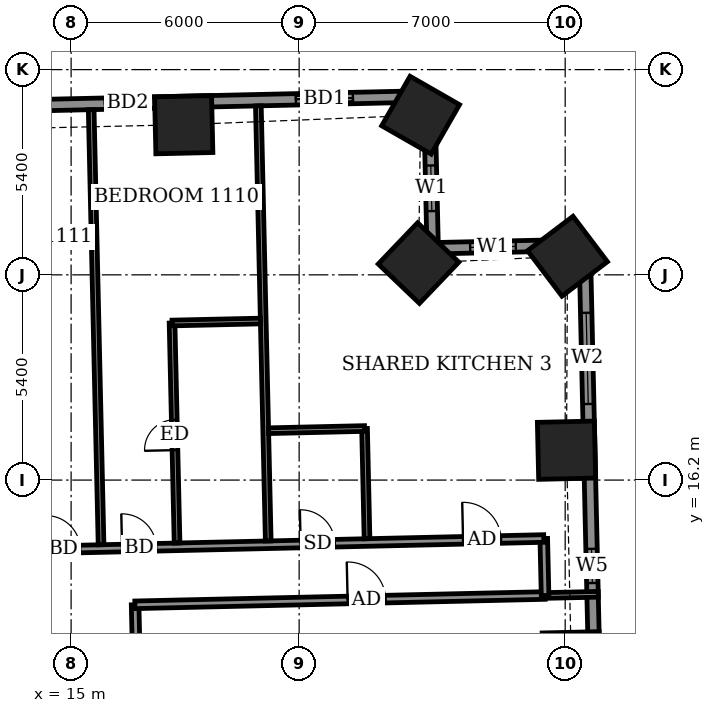
"""IFC4 building model, lengths in metres.
Left out: names, types, materials, properties, quantities, classifications, styles, units other than length and angle.
Written with IfcOpenShell. Run it as: python <this file> out.ifc"""

import sys

from ifc_helpers import new_model, si_unit, direction, frame, frame_2d, origin, origin_2d, place, context, subcontext, project, spatial, rectangle, extrude, element, fill, save


model = new_model("IFC4")
c1 = context("Model", 3, precision=1e-05, world=origin(), true_north=direction((0.0, 1.0)))
c2 = subcontext(c1, "Body", "Model", "MODEL_VIEW")
j1 = project(units=[si_unit("LENGTHUNIT", "METRE"), si_unit("PLANEANGLEUNIT", "RADIAN")], contexts=[c1])
p1 = place(None, origin())
s1 = spatial("IfcSite", under=j1, at=p1, CompositionType="ELEMENT")
p2 = place(p1, origin())
s2 = spatial("IfcBuilding", under=s1, at=p2, CompositionType="ELEMENT")
p3 = place(p2, frame((0.0, 0.0, 48.5)))
s3 = spatial("IfcBuildingStorey", under=s2, at=p3, CompositionType="ELEMENT", Elevation=48.5)
for number, where, z_axis, x_axis in (
    (1, (28.16, 11.445, -0.55), (0.0, 0.0, 1.0), (-0.023, 1.0, 0.0)),
    (2, (28.035, 16.986, -0.55), (0.0, 0.0, 1.0), (-0.023, 1.0, 0.0)),
    (3, (28.061, 22.09, -0.55), (0.0, 0.0, 1.0), (-0.604, 0.797, 0.0)),
    (4, (24.142, 21.91, -0.55), (0.0, 0.0, 1.0), (-0.723, 0.691, 0.0)),
    (5, (24.196, 25.8, -0.55), (0.0, 0.0, 1.0), (-0.868, 0.497, 0.0)),
    (6, (17.963, 25.551, -0.55), (0.0, 0.0, 1.0), (-1.0, -0.023, 0.0)),
):
    element("IfcColumn", number, at=place(p3, frame(where, z_axis=z_axis, x_axis=x_axis)), inside=s3, PredefinedType="COLUMN", context=c2, shape_type="SweptSolid", body=[
        extrude(rectangle(XDim=1.5, YDim=1.5, at=origin_2d()), origin(), (0.0, 0.0, 1.0), 3.6),
    ])
p4 = place(p3, frame((28.887, 5.864, 0.0), z_axis=(0.0, 0.0, 1.0), x_axis=(-0.022687182773, 0.999742612745, 0.0)))
e7 = element("IfcWall", 7, at=p4, inside=s3, PredefinedType="SOLIDWALL", context=c2, shape_type="SweptSolid", body=[
    extrude(rectangle(XDim=16.529, YDim=0.3, at=frame_2d((8.265, 0.0))), origin(), (0.0, 0.0, 1.0), 3.05),
])
p5 = place(p4, frame((2.942, 0.0, 0.0)))
e8 = element("IfcOpeningElement", 8, at=p5, cuts=e7, PredefinedType="OPENING", context=c2, shape_type="SweptSolid", body=[
    extrude(rectangle(XDim=1.5, YDim=2.4, at=frame_2d((0.75, 1.2))), frame((0.0, 0.16, 0.0), z_axis=(0.0, -1.0, 0.0), x_axis=(1.0, 0.0, 0.0)), (0.0, 0.0, 1.0), 0.32),
])
p6 = place(p4, frame((7.629, 0.0, 0.9)))
e9 = element("IfcOpeningElement", 9, at=p6, cuts=e7, PredefinedType="OPENING", context=c2, shape_type="SweptSolid", body=[
    extrude(rectangle(XDim=0.9, YDim=1.5, at=frame_2d((0.45, 0.75))), frame((0.0, 0.16, 0.0), z_axis=(0.0, -1.0, 0.0), x_axis=(1.0, 0.0, 0.0)), (0.0, 0.0, 1.0), 0.32),
])
p7 = place(p4, frame((12.341, 0.0, 0.9)))
e10 = element("IfcOpeningElement", 10, at=p7, cuts=e7, PredefinedType="OPENING", context=c2, shape_type="SweptSolid", body=[
    extrude(rectangle(XDim=2.4, YDim=1.5, at=frame_2d((1.2, 0.75))), frame((0.0, 0.16, 0.0), z_axis=(0.0, -1.0, 0.0), x_axis=(1.0, 0.0, 0.0)), (0.0, 0.0, 1.0), 0.32),
])
p8 = place(p3, frame((28.512, 22.389, 0.0), z_axis=(0.0, 0.0, 1.0), x_axis=(-0.999747725427, -0.022460754759, 0.0)))
e11 = element("IfcWall", 11, at=p8, inside=s3, PredefinedType="SOLIDWALL", context=c2, shape_type="SweptSolid", body=[
    extrude(rectangle(XDim=4.0, YDim=0.3, at=frame_2d((2.0, 0.0))), origin(), (0.0, 0.0, 1.0), 2.55),
])
p9 = place(p8, frame((1.812, 0.0, 0.9)))
e12 = element("IfcOpeningElement", 12, at=p9, cuts=e11, PredefinedType="OPENING", context=c2, shape_type="SweptSolid", body=[
    extrude(rectangle(XDim=1.2, YDim=1.5, at=frame_2d((0.6, 0.75))), frame((0.0, 0.16, 0.0), z_axis=(0.0, -1.0, 0.0), x_axis=(1.0, 0.0, 0.0)), (0.0, 0.0, 1.0), 0.32),
])
p10 = place(p3, frame((24.513, 22.299, 0.0), z_axis=(0.0, 0.0, 1.0), x_axis=(-0.022460754759, 0.999747725427, 0.0)))
e13 = element("IfcWall", 13, at=p10, inside=s3, PredefinedType="SOLIDWALL", context=c2, shape_type="SweptSolid", body=[
    extrude(rectangle(XDim=4.0, YDim=0.3, at=frame_2d((2.0, 0.0))), origin(), (0.0, 0.0, 1.0), 2.55),
])
p11 = place(p10, frame((0.979, 0.0, 0.9)))
e14 = element("IfcOpeningElement", 14, at=p11, cuts=e13, PredefinedType="OPENING", context=c2, shape_type="SweptSolid", body=[
    extrude(rectangle(XDim=1.2, YDim=1.5, at=frame_2d((0.6, 0.75))), frame((0.0, 0.16, 0.0), z_axis=(0.0, -1.0, 0.0), x_axis=(1.0, 0.0, 0.0)), (0.0, 0.0, 1.0), 0.32),
])
p12 = place(p3, frame((24.423, 26.298, 0.0), z_axis=(0.0, 0.0, 1.0), x_axis=(-0.999742433108, -0.022695097355, 0.0)))
e15 = element("IfcWall", 15, at=p12, inside=s3, PredefinedType="SOLIDWALL", context=c2, shape_type="SweptSolid", body=[
    extrude(rectangle(XDim=52.701, YDim=0.3, at=frame_2d((26.35, 0.0))), origin(), (0.0, 0.0, 1.0), 3.05),
])
p13 = place(p12, frame((2.009, 0.0, 0.0)))
e16 = element("IfcOpeningElement", 16, at=p13, cuts=e15, PredefinedType="OPENING", context=c2, shape_type="SweptSolid", body=[
    extrude(rectangle(XDim=1.5, YDim=2.4, at=frame_2d((0.75, 1.2))), frame((0.0, 0.16, 0.0), z_axis=(0.0, -1.0, 0.0), x_axis=(1.0, 0.0, 0.0)), (0.0, 0.0, 1.0), 0.32),
])
p14 = place(p12, frame((7.337, 0.0, 0.0)))
e17 = element("IfcOpeningElement", 17, at=p14, cuts=e15, PredefinedType="OPENING", context=c2, shape_type="SweptSolid", body=[
    extrude(rectangle(XDim=1.2, YDim=2.4, at=frame_2d((0.6, 1.2))), frame((0.0, 0.16, 0.0), z_axis=(0.0, -1.0, 0.0), x_axis=(1.0, 0.0, 0.0)), (0.0, 0.0, 1.0), 0.32),
])
p15 = place(p12, frame((10.0, 0.0, 0.0)))
e18 = element("IfcOpeningElement", 18, at=p15, cuts=e15, PredefinedType="OPENING", context=c2, shape_type="SweptSolid", body=[
    extrude(rectangle(XDim=1.5, YDim=2.4, at=frame_2d((0.75, 1.2))), frame((0.0, 0.16, 0.0), z_axis=(0.0, -1.0, 0.0), x_axis=(1.0, 0.0, 0.0)), (0.0, 0.0, 1.0), 0.32),
])
p16 = place(p12, frame((14.85, 0.0, 0.0)))
e19 = element("IfcOpeningElement", 19, at=p16, cuts=e15, PredefinedType="OPENING", context=c2, shape_type="SweptSolid", body=[
    extrude(rectangle(XDim=1.5, YDim=2.4, at=frame_2d((0.75, 1.2))), frame((0.0, 0.16, 0.0), z_axis=(0.0, -1.0, 0.0), x_axis=(1.0, 0.0, 0.0)), (0.0, 0.0, 1.0), 0.32),
])
p17 = place(p12, frame((20.638, 0.0, 0.9)))
e20 = element("IfcOpeningElement", 20, at=p17, cuts=e15, PredefinedType="OPENING", context=c2, shape_type="SweptSolid", body=[
    extrude(rectangle(XDim=0.9, YDim=1.5, at=frame_2d((0.45, 0.75))), frame((0.0, 0.16, 0.0), z_axis=(0.0, -1.0, 0.0), x_axis=(1.0, 0.0, 0.0)), (0.0, 0.0, 1.0), 0.32),
])
p18 = place(p12, frame((23.125, 0.0, 0.0)))
e21 = element("IfcOpeningElement", 21, at=p18, cuts=e15, PredefinedType="OPENING", context=c2, shape_type="SweptSolid", body=[
    extrude(rectangle(XDim=1.5, YDim=2.4, at=frame_2d((0.75, 1.2))), frame((0.0, 0.16, 0.0), z_axis=(0.0, -1.0, 0.0), x_axis=(1.0, 0.0, 0.0)), (0.0, 0.0, 1.0), 0.32),
])
p19 = place(p12, frame((27.9, 0.0, 0.0)))
e22 = element("IfcOpeningElement", 22, at=p19, cuts=e15, PredefinedType="OPENING", context=c2, shape_type="SweptSolid", body=[
    extrude(rectangle(XDim=1.5, YDim=2.4, at=frame_2d((0.75, 1.2))), frame((0.0, 0.16, 0.0), z_axis=(0.0, -1.0, 0.0), x_axis=(1.0, 0.0, 0.0)), (0.0, 0.0, 1.0), 0.32),
])
p20 = place(p12, frame((30.862, 0.0, 0.0)))
e23 = element("IfcOpeningElement", 23, at=p20, cuts=e15, PredefinedType="OPENING", context=c2, shape_type="SweptSolid", body=[
    extrude(rectangle(XDim=1.2, YDim=2.4, at=frame_2d((0.6, 1.2))), frame((0.0, 0.16, 0.0), z_axis=(0.0, -1.0, 0.0), x_axis=(1.0, 0.0, 0.0)), (0.0, 0.0, 1.0), 0.32),
])
p21 = place(p12, frame((36.1, 0.0, 0.0)))
e24 = element("IfcOpeningElement", 24, at=p21, cuts=e15, PredefinedType="OPENING", context=c2, shape_type="SweptSolid", body=[
    extrude(rectangle(XDim=1.5, YDim=2.4, at=frame_2d((0.75, 1.2))), frame((0.0, 0.16, 0.0), z_axis=(0.0, -1.0, 0.0), x_axis=(1.0, 0.0, 0.0)), (0.0, 0.0, 1.0), 0.32),
])
p22 = place(p12, frame((40.975, 0.0, 0.0)))
e25 = element("IfcOpeningElement", 25, at=p22, cuts=e15, PredefinedType="OPENING", context=c2, shape_type="SweptSolid", body=[
    extrude(rectangle(XDim=1.5, YDim=2.4, at=frame_2d((0.75, 1.2))), frame((0.0, 0.16, 0.0), z_axis=(0.0, -1.0, 0.0), x_axis=(1.0, 0.0, 0.0)), (0.0, 0.0, 1.0), 0.32),
])
p23 = place(p12, frame((43.788, 0.0, 0.0)))
e26 = element("IfcOpeningElement", 26, at=p23, cuts=e15, PredefinedType="OPENING", context=c2, shape_type="SweptSolid", body=[
    extrude(rectangle(XDim=1.5, YDim=2.4, at=frame_2d((0.75, 1.2))), frame((0.0, 0.16, 0.0), z_axis=(0.0, -1.0, 0.0), x_axis=(1.0, 0.0, 0.0)), (0.0, 0.0, 1.0), 0.32),
])
p24 = place(p12, frame((48.464, 0.0, 0.9)))
e27 = element("IfcOpeningElement", 27, at=p24, cuts=e15, PredefinedType="OPENING", context=c2, shape_type="SweptSolid", body=[
    extrude(rectangle(XDim=2.4, YDim=1.5, at=frame_2d((1.2, 0.75))), frame((0.0, 0.16, 0.0), z_axis=(0.0, -1.0, 0.0), x_axis=(1.0, 0.0, 0.0)), (0.0, 0.0, 1.0), 0.32),
])
p25 = place(p3, frame((16.803, 7.675, 0.0), z_axis=(0.0, 0.0, 1.0), x_axis=(-0.022667483124, 0.999743059595, 0.0)))
e28 = element("IfcWall", 28, at=p25, inside=s3, PredefinedType="PARTITIONING", context=c2, shape_type="SweptSolid", body=[
    extrude(rectangle(XDim=5.245, YDim=0.2, at=frame_2d((2.623, 0.0))), origin(), (0.0, 0.0, 1.0), 3.05),
])
p26 = place(p3, frame((16.679, 12.918, 0.0), z_axis=(0.0, 0.0, 1.0), x_axis=(0.999742162372, 0.022707020428, 0.0)))
e29 = element("IfcWall", 29, at=p26, inside=s3, PredefinedType="PARTITIONING", context=c2, shape_type="SweptSolid", body=[
    extrude(rectangle(XDim=10.795, YDim=0.2, at=frame_2d((5.397, 0.0))), origin(), (0.0, 0.0, 1.0), 3.05),
])
p27 = place(p26, frame((5.598, 0.0, 0.0)))
e30 = element("IfcOpeningElement", 30, at=p27, cuts=e29, PredefinedType="OPENING", context=c2, shape_type="SweptSolid", body=[
    extrude(rectangle(XDim=1.0, YDim=2.1, at=frame_2d((0.5, 1.05))), frame((0.0, 0.11, 0.0), z_axis=(0.0, -1.0, 0.0), x_axis=(1.0, 0.0, 0.0)), (0.0, 0.0, 1.0), 0.22),
])
p28 = place(p3, frame((27.471, 13.163, 0.0), z_axis=(0.0, 0.0, 1.0), x_axis=(0.999739219063, 0.022836240226, 0.0)))
e31 = element("IfcWall", 31, at=p28, inside=s3, PredefinedType="PARTITIONING", context=c2, shape_type="SweptSolid", body=[
    extrude(rectangle(XDim=1.4, YDim=0.15, at=frame_2d((0.7, 0.0))), origin(), (0.0, 0.0, 1.0), 2.55),
])
p29 = place(p3, frame((27.471, 13.163, 0.0), z_axis=(0.0, 0.0, 1.0), x_axis=(-0.022617910375, 0.999744182344, 0.0)))
e32 = element("IfcWall", 32, at=p29, inside=s3, PredefinedType="PARTITIONING", context=c2, shape_type="SweptSolid", body=[
    extrude(rectangle(XDim=1.5, YDim=0.2, at=frame_2d((0.75, 0.0))), origin(), (0.0, 0.0, 1.0), 3.05),
])
p30 = place(p3, frame((-31.347, 13.329, 0.0), z_axis=(0.0, 0.0, 1.0), x_axis=(0.999742613079, 0.022687168058, 0.0)))
e33 = element("IfcWall", 33, at=p30, inside=s3, PredefinedType="PARTITIONING", context=c2, shape_type="SweptSolid", body=[
    extrude(rectangle(XDim=58.799, YDim=0.2, at=frame_2d((29.399, 0.0))), origin(), (0.0, 0.0, 1.0), 3.05),
])
p31 = place(p30, frame((56.675, 0.0, 0.0)))
e34 = element("IfcOpeningElement", 34, at=p31, cuts=e33, PredefinedType="OPENING", context=c2, shape_type="SweptSolid", body=[
    extrude(rectangle(XDim=1.0, YDim=2.1, at=frame_2d((0.5, 1.05))), frame((0.0, 0.11, 0.0), z_axis=(0.0, -1.0, 0.0), x_axis=(1.0, 0.0, 0.0)), (0.0, 0.0, 1.0), 0.22),
])
p32 = place(p30, frame((52.4, 0.0, 0.0)))
e35 = element("IfcOpeningElement", 35, at=p32, cuts=e33, PredefinedType="OPENING", context=c2, shape_type="SweptSolid", body=[
    extrude(rectangle(XDim=0.9, YDim=2.1, at=frame_2d((0.45, 1.05))), frame((0.0, 0.11, 0.0), z_axis=(0.0, -1.0, 0.0), x_axis=(1.0, 0.0, 0.0)), (0.0, 0.0, 1.0), 0.22),
])
p33 = place(p30, frame((47.7, 0.0, 0.0)))
e36 = element("IfcOpeningElement", 36, at=p33, cuts=e33, PredefinedType="OPENING", context=c2, shape_type="SweptSolid", body=[
    extrude(rectangle(XDim=0.9, YDim=2.1, at=frame_2d((0.45, 1.05))), frame((0.0, 0.11, 0.0), z_axis=(0.0, -1.0, 0.0), x_axis=(1.0, 0.0, 0.0)), (0.0, 0.0, 1.0), 0.22),
])
p34 = place(p30, frame((45.7, 0.0, 0.0)))
e37 = element("IfcOpeningElement", 37, at=p34, cuts=e33, PredefinedType="OPENING", context=c2, shape_type="SweptSolid", body=[
    extrude(rectangle(XDim=0.9, YDim=2.1, at=frame_2d((0.45, 1.05))), frame((0.0, 0.11, 0.0), z_axis=(0.0, -1.0, 0.0), x_axis=(1.0, 0.0, 0.0)), (0.0, 0.0, 1.0), 0.22),
])
p35 = place(p30, frame((38.95, 0.0, 0.0)))
e38 = element("IfcOpeningElement", 38, at=p35, cuts=e33, PredefinedType="OPENING", context=c2, shape_type="SweptSolid", body=[
    extrude(rectangle(XDim=0.9, YDim=2.1, at=frame_2d((0.45, 1.05))), frame((0.0, 0.11, 0.0), z_axis=(0.0, -1.0, 0.0), x_axis=(1.0, 0.0, 0.0)), (0.0, 0.0, 1.0), 0.22),
])
p36 = place(p30, frame((37.05, 0.0, 0.0)))
e39 = element("IfcOpeningElement", 39, at=p36, cuts=e33, PredefinedType="OPENING", context=c2, shape_type="SweptSolid", body=[
    extrude(rectangle(XDim=0.9, YDim=2.1, at=frame_2d((0.45, 1.05))), frame((0.0, 0.11, 0.0), z_axis=(0.0, -1.0, 0.0), x_axis=(1.0, 0.0, 0.0)), (0.0, 0.0, 1.0), 0.22),
])
p37 = place(p30, frame((30.375, 0.0, 0.0)))
e40 = element("IfcOpeningElement", 40, at=p37, cuts=e33, PredefinedType="OPENING", context=c2, shape_type="SweptSolid", body=[
    extrude(rectangle(XDim=0.9, YDim=2.1, at=frame_2d((0.45, 1.05))), frame((0.0, 0.11, 0.0), z_axis=(0.0, -1.0, 0.0), x_axis=(1.0, 0.0, 0.0)), (0.0, 0.0, 1.0), 0.22),
])
p38 = place(p30, frame((28.5, 0.0, 0.0)))
e41 = element("IfcOpeningElement", 41, at=p38, cuts=e33, PredefinedType="OPENING", context=c2, shape_type="SweptSolid", body=[
    extrude(rectangle(XDim=0.9, YDim=2.1, at=frame_2d((0.45, 1.05))), frame((0.0, 0.11, 0.0), z_axis=(0.0, -1.0, 0.0), x_axis=(1.0, 0.0, 0.0)), (0.0, 0.0, 1.0), 0.22),
])
p39 = place(p30, frame((21.825, 0.0, 0.0)))
e42 = element("IfcOpeningElement", 42, at=p39, cuts=e33, PredefinedType="OPENING", context=c2, shape_type="SweptSolid", body=[
    extrude(rectangle(XDim=0.9, YDim=2.1, at=frame_2d((0.45, 1.05))), frame((0.0, 0.11, 0.0), z_axis=(0.0, -1.0, 0.0), x_axis=(1.0, 0.0, 0.0)), (0.0, 0.0, 1.0), 0.22),
])
p40 = place(p30, frame((19.95, 0.0, 0.0)))
e43 = element("IfcOpeningElement", 43, at=p40, cuts=e33, PredefinedType="OPENING", context=c2, shape_type="SweptSolid", body=[
    extrude(rectangle(XDim=0.9, YDim=2.1, at=frame_2d((0.45, 1.05))), frame((0.0, 0.11, 0.0), z_axis=(0.0, -1.0, 0.0), x_axis=(1.0, 0.0, 0.0)), (0.0, 0.0, 1.0), 0.22),
])
p41 = place(p30, frame((13.225, 0.0, 0.0)))
e44 = element("IfcOpeningElement", 44, at=p41, cuts=e33, PredefinedType="OPENING", context=c2, shape_type="SweptSolid", body=[
    extrude(rectangle(XDim=0.9, YDim=2.1, at=frame_2d((0.45, 1.05))), frame((0.0, 0.11, 0.0), z_axis=(0.0, -1.0, 0.0), x_axis=(1.0, 0.0, 0.0)), (0.0, 0.0, 1.0), 0.22),
])
p42 = place(p30, frame((11.25, 0.0, 0.0)))
e45 = element("IfcOpeningElement", 45, at=p42, cuts=e33, PredefinedType="OPENING", context=c2, shape_type="SweptSolid", body=[
    extrude(rectangle(XDim=0.9, YDim=2.1, at=frame_2d((0.45, 1.05))), frame((0.0, 0.11, 0.0), z_axis=(0.0, -1.0, 0.0), x_axis=(1.0, 0.0, 0.0)), (0.0, 0.0, 1.0), 0.22),
])
p43 = place(p30, frame((1.75, 0.0, 0.0)))
e46 = element("IfcOpeningElement", 46, at=p43, cuts=e33, PredefinedType="OPENING", context=c2, shape_type="SweptSolid", body=[
    extrude(rectangle(XDim=1.0, YDim=2.1, at=frame_2d((0.5, 1.05))), frame((0.0, 0.11, 0.0), z_axis=(0.0, -1.0, 0.0), x_axis=(1.0, 0.0, 0.0)), (0.0, 0.0, 1.0), 0.22),
])
p44 = place(p30, frame((6.65, 0.0, 0.0)))
e47 = element("IfcOpeningElement", 47, at=p44, cuts=e33, PredefinedType="OPENING", context=c2, shape_type="SweptSolid", body=[
    extrude(rectangle(XDim=0.9, YDim=2.1, at=frame_2d((0.45, 1.05))), frame((0.0, 0.11, 0.0), z_axis=(0.0, -1.0, 0.0), x_axis=(1.0, 0.0, 0.0)), (0.0, 0.0, 1.0), 0.22),
])
p45 = place(p3, frame((15.788, 14.499, 0.0), z_axis=(0.0, 0.0, 1.0), x_axis=(-0.022708327922, 0.999742132674, 0.0)))
e48 = element("IfcWall", 48, at=p45, inside=s3, PredefinedType="PARTITIONING", context=c2, shape_type="SweptSolid", body=[
    extrude(rectangle(XDim=11.45, YDim=0.15, at=frame_2d((5.725, 0.0))), origin(), (0.0, 0.0, 1.0), 2.55),
])
p46 = place(p3, frame((17.788, 14.544, 0.0), z_axis=(0.0, 0.0, 1.0), x_axis=(-0.022809516176, 0.999739829141, 0.0)))
e49 = element("IfcWall", 49, at=p46, inside=s3, PredefinedType="PARTITIONING", context=c2, shape_type="SweptSolid", body=[
    extrude(rectangle(XDim=5.791, YDim=0.15, at=frame_2d((2.895, 0.0))), origin(), (0.0, 0.0, 1.0), 3.05),
])
p47 = place(p46, frame((2.445, 0.0, 0.0)))
e50 = element("IfcOpeningElement", 50, at=p47, cuts=e49, PredefinedType="OPENING", context=c2, shape_type="SweptSolid", body=[
    extrude(rectangle(XDim=0.8, YDim=2.1, at=frame_2d((0.4, 1.05))), frame((0.0, 0.085, 0.0), z_axis=(0.0, -1.0, 0.0), x_axis=(1.0, 0.0, 0.0)), (0.0, 0.0, 1.0), 0.17),
])
p48 = place(p3, frame((20.187, 14.598, 0.0), z_axis=(0.0, 0.0, 1.0), x_axis=(-0.022706391805, 0.999742176649, 0.0)))
e51 = element("IfcWall", 51, at=p48, inside=s3, PredefinedType="PARTITIONING", context=c2, shape_type="SweptSolid", body=[
    extrude(rectangle(XDim=11.451, YDim=0.15, at=frame_2d((5.726, 0.0))), origin(), (0.0, 0.0, 1.0), 2.55),
])
p49 = place(p3, frame((22.786, 14.657, 0.0), z_axis=(0.0, 0.0, 1.0), x_axis=(-0.022388729138, 0.999749340989, 0.0)))
e52 = element("IfcWall", 52, at=p49, inside=s3, PredefinedType="PARTITIONING", context=c2, shape_type="SweptSolid", body=[
    extrude(rectangle(XDim=2.901, YDim=0.15, at=frame_2d((1.45, 0.0))), origin(), (0.0, 0.0, 1.0), 3.05),
])
p50 = place(p3, frame((20.196, 17.499, 0.0), z_axis=(0.0, 0.0, 1.0), x_axis=(0.999737525802, 0.022910248851, 0.0)))
e53 = element("IfcWall", 53, at=p50, inside=s3, PredefinedType="PARTITIONING", context=c2, shape_type="SweptSolid", body=[
    extrude(rectangle(XDim=2.526, YDim=0.15, at=frame_2d((1.263, 0.0))), origin(), (0.0, 0.0, 1.0), 3.05),
])
p51 = place(p3, frame((17.656, 20.333, 0.0), z_axis=(0.0, 0.0, 1.0), x_axis=(0.999749954681, 0.022361308448, 0.0)))
e54 = element("IfcWall", 54, at=p51, inside=s3, PredefinedType="PARTITIONING", context=c2, shape_type="SweptSolid", body=[
    extrude(rectangle(XDim=2.325, YDim=0.15, at=frame_2d((1.163, 0.0))), origin(), (0.0, 0.0, 1.0), 3.05),
])
p52 = place(p6, origin())
e55 = element("IfcWindow", 55, at=p52, inside=s3, PartitioningType="SINGLE_PANEL", PredefinedType="WINDOW", context=c2, shape_type="SweptSolid", body=[
    extrude(rectangle(XDim=0.9, YDim=1.5, at=frame_2d((0.45, 0.75))), frame((0.0, 0.03, 0.0), z_axis=(0.0, -1.0, 0.0), x_axis=(1.0, 0.0, 0.0)), (0.0, 0.0, 1.0), 0.06),
])
fill(e9, e55)
p53 = place(p7, origin())
e56 = element("IfcWindow", 56, at=p53, inside=s3, PartitioningType="DOUBLE_PANEL_VERTICAL", PredefinedType="WINDOW", context=c2, shape_type="SweptSolid", body=[
    extrude(rectangle(XDim=2.4, YDim=1.5, at=frame_2d((1.2, 0.75))), frame((0.0, 0.03, 0.0), z_axis=(0.0, -1.0, 0.0), x_axis=(1.0, 0.0, 0.0)), (0.0, 0.0, 1.0), 0.06),
])
fill(e10, e56)
p54 = place(p9, origin())
e57 = element("IfcWindow", 57, at=p54, inside=s3, PartitioningType="SINGLE_PANEL", PredefinedType="WINDOW", context=c2, shape_type="SweptSolid", body=[
    extrude(rectangle(XDim=1.2, YDim=1.5, at=frame_2d((0.6, 0.75))), frame((0.0, 0.03, 0.0), z_axis=(0.0, -1.0, 0.0), x_axis=(1.0, 0.0, 0.0)), (0.0, 0.0, 1.0), 0.06),
])
fill(e12, e57)
p55 = place(p11, origin())
e58 = element("IfcWindow", 58, at=p55, inside=s3, PartitioningType="SINGLE_PANEL", PredefinedType="WINDOW", context=c2, shape_type="SweptSolid", body=[
    extrude(rectangle(XDim=1.2, YDim=1.5, at=frame_2d((0.6, 0.75))), frame((0.0, 0.03, 0.0), z_axis=(0.0, -1.0, 0.0), x_axis=(1.0, 0.0, 0.0)), (0.0, 0.0, 1.0), 0.06),
])
fill(e14, e58)
p56 = place(p13, origin())
e59 = element("IfcDoor", 59, at=p56, inside=s3, OperationType="SLIDING_TO_LEFT", PredefinedType="DOOR", context=c2, shape_type="SweptSolid", body=[
    extrude(rectangle(XDim=1.5, YDim=2.4, at=frame_2d((0.75, 1.2))), frame((0.0, 0.025, 0.0), z_axis=(0.0, -1.0, 0.0), x_axis=(1.0, 0.0, 0.0)), (0.0, 0.0, 1.0), 0.05),
])
fill(e16, e59)
p57 = place(p14, origin())
e60 = element("IfcDoor", 60, at=p57, inside=s3, OperationType="SLIDING_TO_LEFT", PredefinedType="DOOR", context=c2, shape_type="SweptSolid", body=[
    extrude(rectangle(XDim=1.2, YDim=2.4, at=frame_2d((0.6, 1.2))), frame((0.0, 0.025, 0.0), z_axis=(0.0, -1.0, 0.0), x_axis=(1.0, 0.0, 0.0)), (0.0, 0.0, 1.0), 0.05),
])
fill(e17, e60)
p58 = place(p27, origin())
e61 = element("IfcDoor", 61, at=p58, inside=s3, OperationType="SINGLE_SWING_LEFT", PredefinedType="DOOR", context=c2, shape_type="SweptSolid", body=[
    extrude(rectangle(XDim=1.0, YDim=2.1, at=frame_2d((0.5, 1.05))), frame((0.0, 0.025, 0.0), z_axis=(0.0, -1.0, 0.0), x_axis=(1.0, 0.0, 0.0)), (0.0, 0.0, 1.0), 0.05),
])
fill(e30, e61)
p59 = place(p31, origin())
e62 = element("IfcDoor", 62, at=p59, inside=s3, OperationType="SINGLE_SWING_RIGHT", PredefinedType="DOOR", context=c2, shape_type="SweptSolid", body=[
    extrude(rectangle(XDim=1.0, YDim=2.1, at=frame_2d((0.5, 1.05))), frame((0.0, 0.025, 0.0), z_axis=(0.0, -1.0, 0.0), x_axis=(1.0, 0.0, 0.0)), (0.0, 0.0, 1.0), 0.05),
])
fill(e34, e62)
p60 = place(p32, origin())
e63 = element("IfcDoor", 63, at=p60, inside=s3, OperationType="SINGLE_SWING_RIGHT", PredefinedType="DOOR", context=c2, shape_type="SweptSolid", body=[
    extrude(rectangle(XDim=0.9, YDim=2.1, at=frame_2d((0.45, 1.05))), frame((0.0, 0.025, 0.0), z_axis=(0.0, -1.0, 0.0), x_axis=(1.0, 0.0, 0.0)), (0.0, 0.0, 1.0), 0.05),
])
fill(e35, e63)
p61 = place(p33, origin())
e64 = element("IfcDoor", 64, at=p61, inside=s3, OperationType="SINGLE_SWING_RIGHT", PredefinedType="DOOR", context=c2, shape_type="SweptSolid", body=[
    extrude(rectangle(XDim=0.9, YDim=2.1, at=frame_2d((0.45, 1.05))), frame((0.0, 0.025, 0.0), z_axis=(0.0, -1.0, 0.0), x_axis=(1.0, 0.0, 0.0)), (0.0, 0.0, 1.0), 0.05),
])
fill(e36, e64)
p62 = place(p47, origin())
e65 = element("IfcDoor", 65, at=p62, inside=s3, OperationType="SINGLE_SWING_RIGHT", PredefinedType="DOOR", context=c2, shape_type="SweptSolid", body=[
    extrude(rectangle(XDim=0.8, YDim=2.1, at=frame_2d((0.4, 1.05))), frame((0.0, 0.025, 0.0), z_axis=(0.0, -1.0, 0.0), x_axis=(1.0, 0.0, 0.0)), (0.0, 0.0, 1.0), 0.05),
])
fill(e50, e65)
p63 = place(p34, origin())
e66 = element("IfcDoor", 66, at=p63, inside=s3, OperationType="SINGLE_SWING_LEFT", PredefinedType="DOOR", context=c2, shape_type="SweptSolid", body=[
    extrude(rectangle(XDim=0.9, YDim=2.1, at=frame_2d((0.45, 1.05))), frame((0.0, 0.025, 0.0), z_axis=(0.0, -1.0, 0.0), x_axis=(1.0, 0.0, 0.0)), (0.0, 0.0, 1.0), 0.05),
])
fill(e37, e66)
save(model, sys.argv[1])
